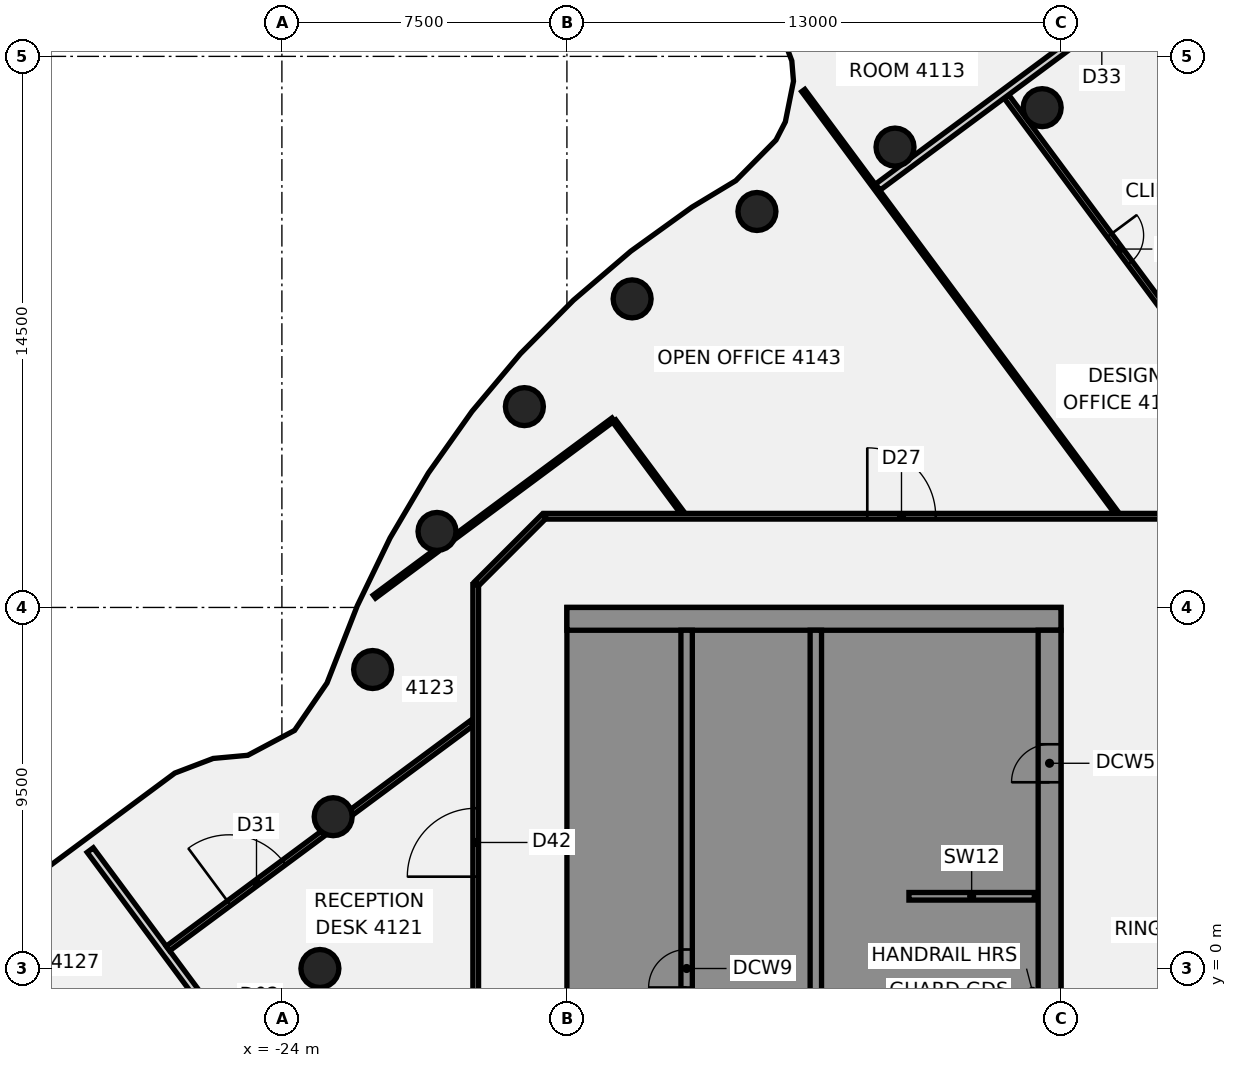
"""IFC4 building model, lengths in metres.
Left out: names, types, materials, properties, quantities, classifications, styles, units other than length and angle.
Written with IfcOpenShell. Run it as: python <this file> out.ifc"""

import sys

from ifc_helpers import new_model, si_unit, direction, frame, frame_2d, origin, origin_2d, place, context, subcontext, project, spatial, polyline, rectangle, circle, outline, extrude, element, fill, save


model = new_model("IFC4")
c1 = context("Model", 3, precision=1e-05, world=origin(), true_north=direction((0.0, 1.0)))
c2 = subcontext(c1, "Body", "Model", "MODEL_VIEW")
j1 = project(units=[si_unit("LENGTHUNIT", "METRE"), si_unit("PLANEANGLEUNIT", "RADIAN")], contexts=[c1])
p1 = place(None, origin())
s1 = spatial("IfcSite", under=j1, at=p1, CompositionType="ELEMENT")
p2 = place(p1, origin())
s2 = spatial("IfcBuilding", under=s1, at=p2, CompositionType="ELEMENT")
p3 = place(p2, frame((0.0, 0.0, 166.75)))
s3 = spatial("IfcBuildingStorey", under=s2, at=p3, CompositionType="ELEMENT", Elevation=166.75)
for number, where, z_axis, x_axis in (
    (1, (-3.994, 22.651, -0.14), (0.0, 0.0, 1.0), (1.0, 0.0, 0.0)),
    (2, (-7.866, 21.613, -0.14), (0.0, 0.0, 1.0), (1.0, 0.0, 0.0)),
    (3, (-11.5, 19.919, -0.14), (0.0, 0.0, 1.0), (1.0, 0.0, 0.0)),
    (4, (-14.784, 17.619, -0.14), (0.0, 0.0, 1.0), (1.0, 0.0, 0.0)),
    (5, (-17.619, 14.784, -0.14), (0.0, 0.0, 1.0), (1.0, 0.0, 0.0)),
    (6, (-19.919, 11.5, -0.14), (0.0, 0.0, 1.0), (1.0, 0.0, 0.0)),
    (7, (-21.613, 7.866, -0.14), (0.0, 0.0, 1.0), (1.0, 0.0, 0.0)),
    (8, (-22.651, 3.994, -0.14), (0.0, 0.0, 1.0), (1.0, 0.0, 0.0)),
    (9, (-23.0, 0.0, -0.14), (0.0, 0.0, 1.0), (1.0, 0.0, 0.0)),
):
    element("IfcColumn", number, at=place(p3, frame(where, z_axis=z_axis, x_axis=x_axis)), inside=s3, PredefinedType="COLUMN", context=c2, shape_type="SweptSolid", body=[
        extrude(circle(Radius=0.5, at=origin_2d()), origin(), (0.0, 0.0, 1.0), 3.75),
    ])
p4 = place(p3, frame((-29.043, 3.116, 0.0), z_axis=(0.0, 0.0, 1.0), x_axis=(0.595824418901, -0.803114725205, 0.0)))
e10 = element("IfcWall", 10, at=p4, inside=s3, PredefinedType="PARTITIONING", context=c2, shape_type="SweptSolid", body=[
    extrude(rectangle(XDim=14.219, YDim=0.2, at=frame_2d((7.11, 0.0))), origin(), (0.0, 0.0, 1.0), 3.01),
])
p5 = place(p4, frame((5.799, 0.0, 0.0)))
e11 = element("IfcOpeningElement", 11, at=p5, cuts=e10, PredefinedType="OPENING", context=c2, shape_type="SweptSolid", body=[
    extrude(rectangle(XDim=1.4, YDim=2.1, at=frame_2d((0.7, 1.05))), frame((0.0, 0.11, 0.0), z_axis=(0.0, -1.0, 0.0), x_axis=(1.0, 0.0, 0.0)), (0.0, 0.0, 1.0), 0.22),
])
p6 = place(p3, frame((-15.254, 14.405, 0.0), z_axis=(0.0, 0.0, 1.0), x_axis=(0.595811472465, -0.803124329901, 0.0)))
e12 = element("IfcWall", 12, at=p6, inside=s3, PredefinedType="PARTITIONING", context=c2, shape_type="SweptSolid", body=[
    extrude(rectangle(XDim=3.009, YDim=0.1, at=frame_2d((1.504, 0.0))), origin(), (0.0, 0.0, 1.0), 3.01),
])
p7 = place(p3, frame((-10.28, 23.102, 0.0), z_axis=(0.0, 0.0, 1.0), x_axis=(0.595748539786, -0.803171013759, 0.0)))
e13 = element("IfcWall", 13, at=p7, inside=s3, PredefinedType="PARTITIONING", context=c2, shape_type="SweptSolid", body=[
    extrude(rectangle(XDim=13.837, YDim=0.1, at=frame_2d((6.918, 0.0))), origin(), (0.0, 0.0, 1.0), 3.01),
])
p8 = place(p3, frame((-4.935, 22.946, 0.0), z_axis=(0.0, 0.0, 1.0), x_axis=(0.595807043393, -0.803127615665, 0.0)))
e14 = element("IfcWall", 14, at=p8, inside=s3, PredefinedType="PARTITIONING", context=c2, shape_type="SweptSolid", body=[
    extrude(rectangle(XDim=13.628, YDim=0.15, at=frame_2d((6.814, 0.0))), origin(), (0.0, 0.0, 1.0), 3.01),
])
p9 = place(p8, frame((4.55, 0.0, 0.0)))
e15 = element("IfcOpeningElement", 15, at=p9, cuts=e14, PredefinedType="OPENING", context=c2, shape_type="SweptSolid", body=[
    extrude(rectangle(XDim=0.9, YDim=2.1, at=frame_2d((0.45, 1.05))), frame((0.0, 0.085, 0.0), z_axis=(0.0, -1.0, 0.0), x_axis=(1.0, 0.0, 0.0)), (0.0, 0.0, 1.0), 0.17),
])
p10 = place(p3, frame((-17.065, 11.9, 0.0), z_axis=(0.0, 0.0, 1.0), x_axis=(1.0, 0.0, 0.0)))
e16 = element("IfcWall", 16, at=p10, inside=s3, PredefinedType="PARTITIONING", context=c2, shape_type="SweptSolid", body=[
    extrude(rectangle(XDim=34.165, YDim=0.15, at=frame_2d((17.083, 0.0))), origin(), (0.0, 0.0, 1.0), 3.01),
])
p11 = place(p10, frame((22.724, 0.0, 0.0)))
e17 = element("IfcOpeningElement", 17, at=p11, cuts=e16, PredefinedType="OPENING", context=c2, shape_type="SweptSolid", body=[
    extrude(rectangle(XDim=1.8, YDim=2.1, at=frame_2d((0.9, 1.05))), frame((0.0, 0.085, 0.0), z_axis=(0.0, -1.0, 0.0), x_axis=(1.0, 0.0, 0.0)), (0.0, 0.0, 1.0), 0.17),
])
p12 = place(p10, frame((28.748, 0.0, 0.0)))
e18 = element("IfcOpeningElement", 18, at=p12, cuts=e16, PredefinedType="OPENING", context=c2, shape_type="SweptSolid", body=[
    extrude(rectangle(XDim=1.8, YDim=2.1, at=frame_2d((0.9, 1.05))), frame((0.0, 0.085, 0.0), z_axis=(0.0, -1.0, 0.0), x_axis=(1.0, 0.0, 0.0)), (0.0, 0.0, 1.0), 0.17),
])
p13 = place(p10, frame((8.469, 0.0, 0.0)))
e19 = element("IfcOpeningElement", 19, at=p13, cuts=e16, PredefinedType="OPENING", context=c2, shape_type="SweptSolid", body=[
    extrude(rectangle(XDim=1.8, YDim=2.1, at=frame_2d((0.9, 1.05))), frame((0.0, 0.085, 0.0), z_axis=(0.0, -1.0, 0.0), x_axis=(1.0, 0.0, 0.0)), (0.0, 0.0, 1.0), 0.17),
])
p14 = place(p3, frame((-26.998, 0.527, 0.0), z_axis=(0.0, 0.0, 1.0), x_axis=(0.803172828939, 0.595746092605, 0.0)))
e20 = element("IfcWall", 20, at=p14, inside=s3, PredefinedType="PARTITIONING", context=c2, shape_type="SweptSolid", body=[
    extrude(rectangle(XDim=5.088, YDim=0.15, at=frame_2d((2.544, 0.0))), origin(), (0.0, 0.0, 1.0), 3.01),
])
p15 = place(p14, frame((2.0, 0.0, 0.0)))
e21 = element("IfcOpeningElement", 21, at=p15, cuts=e20, PredefinedType="OPENING", context=c2, shape_type="SweptSolid", body=[
    extrude(rectangle(XDim=1.8, YDim=2.1, at=frame_2d((0.9, 1.05))), frame((0.0, 0.085, 0.0), z_axis=(0.0, -1.0, 0.0), x_axis=(1.0, 0.0, 0.0)), (0.0, 0.0, 1.0), 0.17),
])
p16 = place(p3, frame((-22.171, 4.107, 0.0), z_axis=(0.0, 0.0, 1.0), x_axis=(0.803180127116, 0.595736253225, 0.0)))
e22 = element("IfcWall", 22, at=p16, inside=s3, PredefinedType="PARTITIONING", context=c2, shape_type="SweptSolid", body=[
    extrude(rectangle(XDim=3.947, YDim=0.15, at=frame_2d((1.974, 0.0))), origin(), (0.0, 0.0, 1.0), 3.01),
])
p17 = place(p3, frame((-21.566, 9.784, 0.0), z_axis=(0.0, 0.0, 1.0), x_axis=(0.803148127908, 0.595779392593, 0.0)))
e23 = element("IfcWall", 23, at=p17, inside=s3, PredefinedType="PARTITIONING", context=c2, shape_type="SweptSolid", body=[
    extrude(rectangle(XDim=2.031, YDim=0.1, at=frame_2d((1.016, 0.0))), origin(), (0.0, 0.0, 1.0), 3.01),
])
p18 = place(p3, frame((-19.447, 11.357, 0.0), z_axis=(0.0, 0.0, 1.0), x_axis=(0.803131470392, 0.595801847317, 0.0)))
e24 = element("IfcWall", 24, at=p18, inside=s3, PredefinedType="PARTITIONING", context=c2, shape_type="SweptSolid", body=[
    extrude(rectangle(XDim=5.184, YDim=0.1, at=frame_2d((2.592, 0.0))), origin(), (0.0, 0.0, 1.0), 3.01),
])
p19 = place(p3, frame((-8.32, 20.56, 0.0), z_axis=(0.0, 0.0, 1.0), x_axis=(0.803159426549, 0.595764161012, 0.0)))
e25 = element("IfcWall", 25, at=p19, inside=s3, PredefinedType="PARTITIONING", context=c2, shape_type="SweptSolid", body=[
    extrude(rectangle(XDim=14.239, YDim=0.2, at=frame_2d((7.12, 0.0))), origin(), (0.0, 0.0, 1.0), 3.01),
])
p20 = place(p19, frame((6.64, 0.0, 0.0)))
e26 = element("IfcOpeningElement", 26, at=p20, cuts=e25, PredefinedType="OPENING", context=c2, shape_type="SweptSolid", body=[
    extrude(rectangle(XDim=1.4, YDim=2.1, at=frame_2d((0.7, 1.05))), frame((0.0, 0.11, 0.0), z_axis=(0.0, -1.0, 0.0), x_axis=(1.0, 0.0, 0.0)), (0.0, 0.0, 1.0), 0.22),
])
p21 = place(p19, frame((9.64, 0.0, 0.0)))
e27 = element("IfcOpeningElement", 27, at=p21, cuts=e25, PredefinedType="OPENING", context=c2, shape_type="SweptSolid", body=[
    extrude(rectangle(XDim=0.9, YDim=2.1, at=frame_2d((0.45, 1.05))), frame((0.0, 0.11, 0.0), z_axis=(0.0, -1.0, 0.0), x_axis=(1.0, 0.0, 0.0)), (0.0, 0.0, 1.0), 0.22),
])
p22 = place(p3, frame((-18.872, 10.128, 0.0), z_axis=(0.0, 0.0, 1.0), x_axis=(0.707106781187, 0.707106781187, 0.0)))
e28 = element("IfcWall", 28, at=p22, inside=s3, PredefinedType="PARTITIONING", context=c2, shape_type="SweptSolid", body=[
    extrude(rectangle(XDim=2.505, YDim=0.15, at=frame_2d((1.253, 0.0))), origin(), (0.0, 0.0, 1.0), 3.01),
])
p23 = place(p3, frame((-18.9, -10.1, 0.0), z_axis=(0.0, 0.0, 1.0), x_axis=(0.0, 1.0, 0.0)))
e29 = element("IfcWall", 29, at=p23, inside=s3, PredefinedType="PARTITIONING", context=c2, shape_type="SweptSolid", body=[
    extrude(rectangle(XDim=20.2, YDim=0.15, at=frame_2d((10.1, 0.0))), origin(), (0.0, 0.0, 1.0), 3.01),
])
p24 = place(p23, frame((12.516, 0.0, 0.0)))
e30 = element("IfcOpeningElement", 30, at=p24, cuts=e29, PredefinedType="OPENING", context=c2, shape_type="SweptSolid", body=[
    extrude(rectangle(XDim=1.8, YDim=2.1, at=frame_2d((0.9, 1.05))), frame((0.0, 0.085, 0.0), z_axis=(0.0, -1.0, 0.0), x_axis=(1.0, 0.0, 0.0)), (0.0, 0.0, 1.0), 0.17),
])
p25 = place(p23, frame((4.437, 0.0, 0.0)))
e31 = element("IfcOpeningElement", 31, at=p25, cuts=e29, PredefinedType="OPENING", context=c2, shape_type="SweptSolid", body=[
    extrude(rectangle(XDim=0.9, YDim=2.1, at=frame_2d((0.45, 1.05))), frame((0.0, 0.085, 0.0), z_axis=(0.0, -1.0, 0.0), x_axis=(1.0, 0.0, 0.0)), (0.0, 0.0, 1.0), 0.17),
])
p26 = place(p3, origin())
e32 = element("IfcWall", 32, at=p26, inside=s3, PredefinedType="SHEAR", context=c2, shape_type="SweptSolid", body=[
    extrude(outline(polyline([(-13.5, -8.125), (-15.9, -8.125), (-15.9, -5.625), (-13.5, -5.625), (-13.5, -5.375), (-15.9, -5.375), (-15.9, 5.375), (-13.5, 5.375), (-13.5, 5.625), (-15.9, 5.625), (-15.9, 8.125), (-13.5, 8.125), (-13.5, 8.9), (-15.9, 8.9), (-16.5, 8.9), (-16.5, -8.9), (-15.9, -8.9), (-13.5, -8.9), (-13.5, -8.125)])), origin(), (0.0, 0.0, 1.0), 3.61),
])
p27 = place(p3, frame((-16.5, 9.2, 0.0), z_axis=(0.0, 0.0, 1.0), x_axis=(1.0, 0.0, 0.0)))
e33 = element("IfcWall", 33, at=p27, inside=s3, PredefinedType="SHEAR", context=c2, shape_type="SweptSolid", body=[
    extrude(rectangle(XDim=13.0, YDim=0.6, at=frame_2d((6.5, 0.0))), origin(), (0.0, 0.0, 1.0), 3.61),
])
p28 = place(p3, origin())
e34 = element("IfcWall", 34, at=p28, inside=s3, PredefinedType="SHEAR", context=c2, shape_type="SweptSolid", body=[
    extrude(outline(polyline([(-9.8, -5.375), (-9.8, -5.625), (-7.5, -5.625), (-7.2, -5.625), (-7.2, 8.9), (-7.5, 8.9), (-9.8, 8.9), (-9.8, 8.125), (-7.5, 8.125), (-7.5, 5.625), (-9.8, 5.625), (-9.8, 5.375), (-7.5, 5.375), (-7.5, 2.875), (-9.8, 2.875), (-9.8, 2.625), (-7.5, 2.625), (-7.5, 0.125), (-9.8, 0.125), (-9.8, -0.125), (-7.5, -0.125), (-7.5, -2.625), (-9.8, -2.625), (-9.8, -2.875), (-7.5, -2.875), (-7.5, -5.375), (-9.8, -5.375)])), origin(), (0.0, 0.0, 1.0), 3.61),
])
p29 = place(p3, frame((-7.5, 1.9, 0.0), z_axis=(0.0, 0.0, 1.0), x_axis=(1.0, 0.0, 0.0)))
e35 = element("IfcWall", 35, at=p29, inside=s3, PredefinedType="SHEAR", context=c2, shape_type="SweptSolid", body=[
    extrude(rectangle(XDim=3.3, YDim=0.2, at=frame_2d((1.65, 0.0))), origin(), (0.0, 0.0, 1.0), 3.61),
])
p30 = place(p3, frame((-13.35, -8.9, 0.0), z_axis=(0.0, 0.0, 1.0), x_axis=(0.0, 1.0, 0.0)))
e36 = element("IfcWall", 36, at=p30, inside=s3, PredefinedType="SHEAR", context=c2, shape_type="SweptSolid", body=[
    extrude(rectangle(XDim=17.8, YDim=0.3, at=frame_2d((8.9, 0.0))), origin(), (0.0, 0.0, 1.0), 3.61),
])
p31 = place(p30, frame((1.325, 0.0, 0.0)))
e37 = element("IfcOpeningElement", 37, at=p31, cuts=e36, PredefinedType="OPENING", context=c2, shape_type="SweptSolid", body=[
    extrude(rectangle(XDim=1.4, YDim=2.1, at=frame_2d((0.7, 1.05))), frame((0.0, 0.16, 0.0), z_axis=(0.0, -1.0, 0.0), x_axis=(1.0, 0.0, 0.0)), (0.0, 0.0, 1.0), 0.32),
])
p32 = place(p30, frame((8.4, 0.0, 0.0)))
e38 = element("IfcOpeningElement", 38, at=p32, cuts=e36, PredefinedType="OPENING", context=c2, shape_type="SweptSolid", body=[
    extrude(rectangle(XDim=1.0, YDim=2.1, at=frame_2d((0.5, 1.05))), frame((0.0, 0.16, 0.0), z_axis=(0.0, -1.0, 0.0), x_axis=(1.0, 0.0, 0.0)), (0.0, 0.0, 1.0), 0.32),
])
p33 = place(p3, frame((-9.95, -8.9, 0.0), z_axis=(0.0, 0.0, 1.0), x_axis=(0.0, 1.0, 0.0)))
e39 = element("IfcWall", 39, at=p33, inside=s3, PredefinedType="SHEAR", context=c2, shape_type="SweptSolid", body=[
    extrude(rectangle(XDim=17.8, YDim=0.3, at=frame_2d((8.9, 0.0))), origin(), (0.0, 0.0, 1.0), 3.61),
])
p34 = place(p33, frame((4.175, 0.0, 0.0)))
e40 = element("IfcOpeningElement", 40, at=p34, cuts=e39, PredefinedType="OPENING", context=c2, shape_type="SweptSolid", body=[
    extrude(rectangle(XDim=1.2, YDim=2.1, at=frame_2d((0.6, 1.05))), frame((0.0, 0.16, 0.0), z_axis=(0.0, -1.0, 0.0), x_axis=(1.0, 0.0, 0.0)), (0.0, 0.0, 1.0), 0.32),
])
p35 = place(p33, frame((6.925, 0.0, 0.0)))
e41 = element("IfcOpeningElement", 41, at=p35, cuts=e39, PredefinedType="OPENING", context=c2, shape_type="SweptSolid", body=[
    extrude(rectangle(XDim=1.2, YDim=2.1, at=frame_2d((0.6, 1.05))), frame((0.0, 0.16, 0.0), z_axis=(0.0, -1.0, 0.0), x_axis=(1.0, 0.0, 0.0)), (0.0, 0.0, 1.0), 0.32),
])
p36 = place(p3, frame((-3.8, -8.9, 0.0), z_axis=(0.0, 0.0, 1.0), x_axis=(0.0, 1.0, 0.0)))
e42 = element("IfcWall", 42, at=p36, inside=s3, PredefinedType="SHEAR", context=c2, shape_type="SweptSolid", body=[
    extrude(rectangle(XDim=17.8, YDim=0.6, at=frame_2d((8.9, 0.0))), origin(), (0.0, 0.0, 1.0), 3.61),
])
p37 = place(p36, frame((1.25, 0.0, 0.0)))
e43 = element("IfcOpeningElement", 43, at=p37, cuts=e42, PredefinedType="OPENING", context=c2, shape_type="SweptSolid", body=[
    extrude(rectangle(XDim=1.8, YDim=2.1, at=frame_2d((0.9, 1.05))), frame((0.0, 0.31, 0.0), z_axis=(0.0, -1.0, 0.0), x_axis=(1.0, 0.0, 0.0)), (0.0, 0.0, 1.0), 0.62),
])
p38 = place(p36, frame((13.8, 0.0, 0.0)))
e44 = element("IfcOpeningElement", 44, at=p38, cuts=e42, PredefinedType="OPENING", context=c2, shape_type="SweptSolid", body=[
    extrude(rectangle(XDim=1.0, YDim=2.1, at=frame_2d((0.5, 1.05))), frame((0.0, 0.31, 0.0), z_axis=(0.0, -1.0, 0.0), x_axis=(1.0, 0.0, 0.0)), (0.0, 0.0, 1.0), 0.62),
])
p39 = place(p9, frame((0.9, 0.0, 0.0), z_axis=(0.0, 0.0, 1.0), x_axis=(-1.0, 0.0, 0.0)))
e45 = element("IfcDoor", 45, at=p39, inside=s3, OperationType="SINGLE_SWING_LEFT", PredefinedType="DOOR", context=c2, shape_type="SweptSolid", body=[
    extrude(rectangle(XDim=0.9, YDim=2.1, at=frame_2d((0.45, 1.05))), frame((0.0, 0.025, 0.0), z_axis=(0.0, -1.0, 0.0), x_axis=(1.0, 0.0, 0.0)), (0.0, 0.0, 1.0), 0.05),
])
fill(e15, e45)
p40 = place(p13, origin())
e46 = element("IfcDoor", 46, at=p40, inside=s3, OperationType="DOUBLE_DOOR_SINGLE_SWING", PredefinedType="DOOR", context=c2, shape_type="SweptSolid", body=[
    extrude(rectangle(XDim=1.8, YDim=2.1, at=frame_2d((0.9, 1.05))), frame((0.0, 0.025, 0.0), z_axis=(0.0, -1.0, 0.0), x_axis=(1.0, 0.0, 0.0)), (0.0, 0.0, 1.0), 0.05),
])
fill(e19, e46)
p41 = place(p15, origin())
e47 = element("IfcDoor", 47, at=p41, inside=s3, OperationType="DOUBLE_DOOR_SINGLE_SWING", PredefinedType="DOOR", context=c2, shape_type="SweptSolid", body=[
    extrude(rectangle(XDim=1.8, YDim=2.1, at=frame_2d((0.9, 1.05))), frame((0.0, 0.025, 0.0), z_axis=(0.0, -1.0, 0.0), x_axis=(1.0, 0.0, 0.0)), (0.0, 0.0, 1.0), 0.05),
])
fill(e21, e47)
p42 = place(p24, frame((1.8, 0.0, 0.0), z_axis=(0.0, 0.0, 1.0), x_axis=(-1.0, 0.0, 0.0)))
e48 = element("IfcDoor", 48, at=p42, inside=s3, OperationType="DOUBLE_DOOR_SINGLE_SWING", PredefinedType="DOOR", context=c2, shape_type="SweptSolid", body=[
    extrude(rectangle(XDim=1.8, YDim=2.1, at=frame_2d((0.9, 1.05))), frame((0.0, 0.025, 0.0), z_axis=(0.0, -1.0, 0.0), x_axis=(1.0, 0.0, 0.0)), (0.0, 0.0, 1.0), 0.05),
])
fill(e30, e48)
p43 = place(p38, origin())
e49 = element("IfcDoor", 49, at=p43, inside=s3, OperationType="SINGLE_SWING_LEFT", PredefinedType="DOOR", context=c2, shape_type="SweptSolid", body=[
    extrude(rectangle(XDim=1.0, YDim=2.1, at=frame_2d((0.5, 1.05))), frame((0.0, 0.025, 0.0), z_axis=(0.0, -1.0, 0.0), x_axis=(1.0, 0.0, 0.0)), (0.0, 0.0, 1.0), 0.05),
])
fill(e44, e49)
p44 = place(p32, origin())
e50 = element("IfcDoor", 50, at=p44, inside=s3, OperationType="SINGLE_SWING_LEFT", PredefinedType="DOOR", context=c2, shape_type="SweptSolid", body=[
    extrude(rectangle(XDim=1.0, YDim=2.1, at=frame_2d((0.5, 1.05))), frame((0.0, 0.025, 0.0), z_axis=(0.0, -1.0, 0.0), x_axis=(1.0, 0.0, 0.0)), (0.0, 0.0, 1.0), 0.05),
])
fill(e38, e50)
save(model, sys.argv[1])
